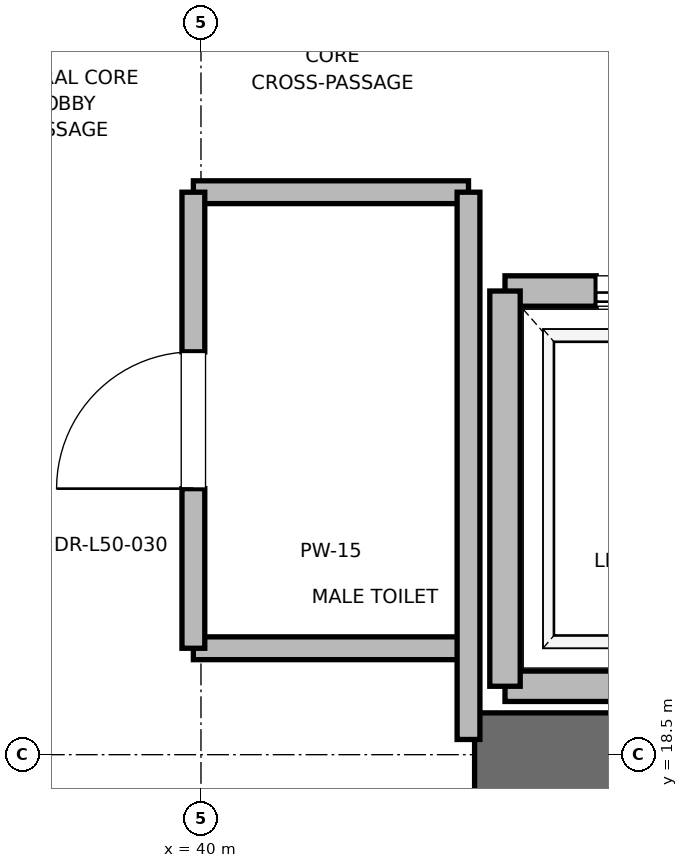
"""IFC4 building model, lengths in metres.
Left out: names, types, materials, properties, quantities, classifications, styles, units other than length and angle.
Written with IfcOpenShell. Run it as: python <this file> out.ifc"""

import sys

from ifc_helpers import new_model, si_unit, direction, frame, frame_2d, origin, place, context, subcontext, project, spatial, rectangle, extrude, element, fill, save


model = new_model("IFC4")
c1 = context("Model", 3, precision=1e-05, world=origin(), true_north=direction((0.0, 1.0)))
c2 = subcontext(c1, "Body", "Model", "MODEL_VIEW")
j1 = project(units=[si_unit("LENGTHUNIT", "METRE"), si_unit("PLANEANGLEUNIT", "RADIAN")], contexts=[c1])
p1 = place(None, origin())
s1 = spatial("IfcSite", under=j1, at=p1, CompositionType="ELEMENT")
p2 = place(p1, origin())
s2 = spatial("IfcBuilding", under=s1, at=p2, CompositionType="ELEMENT")
p3 = place(p2, frame((0.0, 0.0, 217.2)))
s3 = spatial("IfcBuildingStorey", under=s2, at=p3, CompositionType="ELEMENT", Elevation=217.2)
p4 = place(p3, frame((41.8, 18.5, 0.0), z_axis=(0.0, 0.0, 1.0), x_axis=(1.0, 0.0, 0.0)))
e1 = element("IfcWall", 1, at=p4, inside=s3, PredefinedType="SHEAR", context=c2, shape_type="SweptSolid", body=[
    extrude(rectangle(XDim=9.2, YDim=0.55, at=frame_2d((4.6, 0.0))), origin(), (0.0, 0.0, 1.0), 3.775),
])
p5 = place(p3, frame((42.0, 18.95, 0.0), z_axis=(0.0, 0.0, 1.0), x_axis=(1.0, 0.0, 0.0)))
e2 = element("IfcWall", 2, at=p5, inside=s3, PredefinedType="SOLIDWALL", context=c2, shape_type="SweptSolid", body=[
    extrude(rectangle(XDim=2.3, YDim=0.2, at=frame_2d((1.15, 0.0))), origin(), (0.0, 0.0, 1.0), 2.755),
])
p6 = place(p3, frame((44.3, 21.55, 0.0), z_axis=(0.0, 0.0, 1.0), x_axis=(-1.0, 0.0, 0.0)))
e3 = element("IfcWall", 3, at=p6, inside=s3, PredefinedType="SOLIDWALL", context=c2, shape_type="SweptSolid", body=[
    extrude(rectangle(XDim=2.3, YDim=0.2, at=frame_2d((1.15, 0.0))), origin(), (0.0, 0.0, 1.0), 3.775),
])
p7 = place(p6, frame((0.6, 0.0, 0.0)))
e4 = element("IfcOpeningElement", 4, at=p7, cuts=e3, PredefinedType="OPENING", context=c2, shape_type="SweptSolid", body=[
    extrude(rectangle(XDim=1.1, YDim=2.2, at=frame_2d((0.55, 1.1))), frame((0.0, 0.1, 0.0), z_axis=(0.0, -1.0, 0.0), x_axis=(1.0, 0.0, 0.0)), (0.0, 0.0, 1.0), 0.2),
])
p8 = place(p3, frame((42.0, 21.55, 0.0), z_axis=(0.0, 0.0, 1.0), x_axis=(0.0, -1.0, 0.0)))
e5 = element("IfcWall", 5, at=p8, inside=s3, PredefinedType="SOLIDWALL", context=c2, shape_type="SweptSolid", body=[
    extrude(rectangle(XDim=2.6, YDim=0.2, at=frame_2d((1.3, 0.0))), origin(), (0.0, 0.0, 1.0), 2.755),
])
for number, where, z_axis, x_axis in (
    (6, (39.95, 19.2, 0.0), (0.0, 0.0, 1.0), (1.0, 0.0, 0.0)),
    (7, (39.95, 22.2, 0.0), (0.0, 0.0, 1.0), (1.0, 0.0, 0.0)),
):
    element("IfcWall", number, at=place(p3, frame(where, z_axis=z_axis, x_axis=x_axis)), inside=s3, PredefinedType="PARTITIONING", context=c2, shape_type="SweptSolid", body=[
        extrude(rectangle(XDim=1.81, YDim=0.15, at=frame_2d((0.905, 0.0))), origin(), (0.0, 0.0, 1.0), 2.85),
    ])
p9 = place(p3, frame((41.76, 18.6, 0.0), z_axis=(0.0, 0.0, 1.0), x_axis=(0.0, 1.0, 0.0)))
e8 = element("IfcWall", 8, at=p9, inside=s3, PredefinedType="PARTITIONING", context=c2, shape_type="SweptSolid", body=[
    extrude(rectangle(XDim=3.6, YDim=0.15, at=frame_2d((1.8, 0.0))), origin(), (0.0, 0.0, 1.0), 2.755),
])
p10 = place(p3, frame((39.95, 19.2, 0.0), z_axis=(0.0, 0.0, 1.0), x_axis=(0.0, 1.0, 0.0)))
e9 = element("IfcWall", 9, at=p10, inside=s3, PredefinedType="PARTITIONING", context=c2, shape_type="SweptSolid", body=[
    extrude(rectangle(XDim=3.0, YDim=0.15, at=frame_2d((1.5, 0.0))), origin(), (0.0, 0.0, 1.0), 2.85),
])
p11 = place(p10, frame((1.05, 0.0, 0.0)))
e10 = element("IfcOpeningElement", 10, at=p11, cuts=e9, PredefinedType="OPENING", context=c2, shape_type="SweptSolid", body=[
    extrude(rectangle(XDim=0.9, YDim=2.1, at=frame_2d((0.45, 1.05))), frame((0.0, 0.075, 0.0), z_axis=(0.0, -1.0, 0.0), x_axis=(1.0, 0.0, 0.0)), (0.0, 0.0, 1.0), 0.15),
])
p12 = place(p7, origin())
e11 = element("IfcDoor", 11, at=p12, inside=s3, OperationType="SLIDING_TO_RIGHT", PredefinedType="DOOR", context=c2, shape_type="SweptSolid", body=[
    extrude(rectangle(XDim=1.1, YDim=2.2, at=frame_2d((0.55, 1.1))), frame((0.0, 0.025, 0.0), z_axis=(0.0, -1.0, 0.0), x_axis=(1.0, 0.0, 0.0)), (0.0, 0.0, 1.0), 0.05),
])
fill(e4, e11)
p13 = place(p11, origin())
e12 = element("IfcDoor", 12, at=p13, inside=s3, OperationType="SINGLE_SWING_LEFT", PredefinedType="DOOR", context=c2, shape_type="SweptSolid", body=[
    extrude(rectangle(XDim=0.9, YDim=2.1, at=frame_2d((0.45, 1.05))), frame((0.0, 0.025, 0.0), z_axis=(0.0, -1.0, 0.0), x_axis=(1.0, 0.0, 0.0)), (0.0, 0.0, 1.0), 0.05),
])
fill(e10, e12)
save(model, sys.argv[1])
